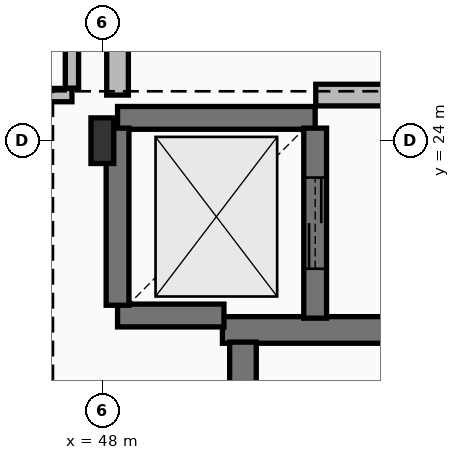
"""IFC4 building model, lengths in metres.
Left out: names, types, materials, properties, quantities, classifications, styles, units other than length and angle.
Written with IfcOpenShell. Run it as: python <this file> out.ifc"""

import sys

from ifc_helpers import new_model, si_unit, direction, frame, frame_2d, origin, origin_2d, place, context, subcontext, project, spatial, rectangle, i_section, extrude, element, fill, save


model = new_model("IFC4")
c1 = context("Model", 3, precision=1e-05, world=origin(), true_north=direction((0.0, 1.0)))
c2 = subcontext(c1, "Body", "Model", "MODEL_VIEW")
j1 = project(units=[si_unit("LENGTHUNIT", "METRE"), si_unit("PLANEANGLEUNIT", "RADIAN")], contexts=[c1])
p1 = place(None, origin())
s1 = spatial("IfcSite", under=j1, at=p1, CompositionType="ELEMENT")
p2 = place(p1, origin())
s2 = spatial("IfcBuilding", under=s1, at=p2, CompositionType="ELEMENT")
p3 = place(p2, origin())
s3 = spatial("IfcBuildingStorey", under=s2, at=p3, CompositionType="ELEMENT", Elevation=0.0)
p4 = place(p3, frame((48.0, 24.0, 0.0), z_axis=(0.0, 0.0, 1.0), x_axis=(1.0, 0.0, 0.0)))
e1 = element("IfcColumn", 1, at=p4, inside=s3, PredefinedType="COLUMN", context=c2, shape_type="SweptSolid", body=[
    extrude(i_section(OverallWidth=0.3, OverallDepth=0.6, WebThickness=0.015, FlangeThickness=0.03, FilletRadius=0.027, at=origin_2d()), origin(), (0.0, 0.0, 1.0), 6.0),
])
p5 = place(p3, frame((49.58, 21.51, 0.0), z_axis=(0.0, 0.0, 1.0), x_axis=(1.0, 0.0, 0.0)))
e2 = element("IfcWall", 2, at=p5, inside=s3, PredefinedType="SHEAR", context=c2, shape_type="SweptSolid", body=[
    extrude(rectangle(XDim=11.15, YDim=0.35, at=frame_2d((5.575, 0.0))), origin(), (0.0, 0.0, 1.0), 5.77),
])
p6 = place(p3, frame((49.85, 16.21, 0.0), z_axis=(0.0, 0.0, 1.0), x_axis=(0.0, 1.0, 0.0)))
e3 = element("IfcWall", 3, at=p6, inside=s3, PredefinedType="SHEAR", context=c2, shape_type="SweptSolid", body=[
    extrude(rectangle(XDim=5.14, YDim=0.35, at=frame_2d((2.57, 0.0))), origin(), (0.0, 0.0, 1.0), 5.77),
])
p7 = place(p3, frame((50.8, 24.3, 0.0), z_axis=(0.0, 0.0, 1.0), x_axis=(-1.0, 0.0, 0.0)))
e4 = element("IfcWall", 4, at=p7, inside=s3, PredefinedType="SHEAR", context=c2, shape_type="SweptSolid", body=[
    extrude(rectangle(XDim=2.6, YDim=0.3, at=frame_2d((1.3, 0.0))), origin(), (0.0, 0.0, 1.0), 5.77),
])
p8 = place(p3, frame((48.2, 21.7, 0.0), z_axis=(0.0, 0.0, 1.0), x_axis=(1.0, 0.0, 0.0)))
e5 = element("IfcWall", 5, at=p8, inside=s3, PredefinedType="SHEAR", context=c2, shape_type="SweptSolid", body=[
    extrude(rectangle(XDim=1.4, YDim=0.3, at=frame_2d((0.7, 0.0))), origin(), (0.0, 0.0, 1.0), 5.77),
])
p9 = place(p3, frame((50.8, 21.665, 0.0), z_axis=(0.0, 0.0, 1.0), x_axis=(0.0, 1.0, 0.0)))
e6 = element("IfcWall", 6, at=p9, inside=s3, PredefinedType="SHEAR", context=c2, shape_type="SweptSolid", body=[
    extrude(rectangle(XDim=2.5, YDim=0.3, at=frame_2d((1.25, 0.0))), origin(), (0.0, 0.0, 1.0), 5.77),
])
p10 = place(p9, frame((0.65, 0.0, 0.0)))
e7 = element("IfcOpeningElement", 7, at=p10, cuts=e6, PredefinedType="OPENING", context=c2, shape_type="SweptSolid", body=[
    extrude(rectangle(XDim=1.2, YDim=2.2, at=frame_2d((0.6, 1.1))), frame((0.0, 0.16, 0.0), z_axis=(0.0, -1.0, 0.0), x_axis=(1.0, 0.0, 0.0)), (0.0, 0.0, 1.0), 0.32),
])
p11 = place(p3, frame((48.2, 24.165, 0.0), z_axis=(0.0, 0.0, 1.0), x_axis=(0.0, -1.0, 0.0)))
e8 = element("IfcWall", 8, at=p11, inside=s3, PredefinedType="SHEAR", context=c2, shape_type="SweptSolid", body=[
    extrude(rectangle(XDim=2.33, YDim=0.3, at=frame_2d((1.165, 0.0))), origin(), (0.0, 0.0, 1.0), 5.77),
])
p12 = place(p3, frame((38.6, 24.6, 0.0), z_axis=(0.0, 0.0, 1.0), x_axis=(1.0, 0.0, 0.0)))
e9 = element("IfcWall", 9, at=p12, inside=s3, PredefinedType="PARTITIONING", context=c2, shape_type="SweptSolid", body=[
    extrude(rectangle(XDim=9.0, YDim=0.175, at=frame_2d((4.5, 0.0))), origin(), (0.0, 0.0, 1.0), 5.77),
])
p13 = place(p12, frame((3.92, 0.0, 0.0)))
e10 = element("IfcOpeningElement", 10, at=p13, cuts=e9, PredefinedType="OPENING", context=c2, shape_type="SweptSolid", body=[
    extrude(rectangle(XDim=1.16, YDim=2.32, at=frame_2d((0.58, 1.16))), frame((0.0, 0.097, 0.0), z_axis=(0.0, -1.0, 0.0), x_axis=(1.0, 0.0, 0.0)), (0.0, 0.0, 1.0), 0.195),
])
p14 = place(p3, frame((47.6, 24.691, 0.0), z_axis=(0.0, 0.0, 1.0), x_axis=(0.0, 1.0, 0.0)))
e11 = element("IfcWall", 11, at=p14, inside=s3, PredefinedType="PARTITIONING", context=c2, shape_type="SweptSolid", body=[
    extrude(rectangle(XDim=14.708, YDim=0.175, at=frame_2d((7.354, 0.0))), origin(), (0.0, 0.0, 1.0), 5.19),
])
p15 = place(p3, frame((50.808, 24.6, 0.0), z_axis=(0.0, 0.0, 1.0), x_axis=(1.0, 0.0, 0.0)))
e12 = element("IfcWall", 12, at=p15, inside=s3, PredefinedType="PLUMBINGWALL", context=c2, shape_type="SweptSolid", body=[
    extrude(rectangle(XDim=3.592, YDim=0.285, at=frame_2d((1.796, 0.0))), origin(), (0.0, 0.0, 1.0), 5.77),
])
p16 = place(p3, frame((48.2, 33.654, 0.0), z_axis=(0.0, 0.0, 1.0), x_axis=(0.0, -1.0, 0.0)))
e13 = element("IfcWall", 13, at=p16, inside=s3, PredefinedType="PLUMBINGWALL", context=c2, shape_type="SweptSolid", body=[
    extrude(rectangle(XDim=9.053, YDim=0.285, at=frame_2d((4.527, 0.0))), origin(), (0.0, 0.0, 1.0), 5.14),
])
p17 = place(p10, origin())
e14 = element("IfcDoor", 14, at=p17, inside=s3, OperationType="DOUBLE_DOOR_SLIDING", PredefinedType="DOOR", context=c2, shape_type="SweptSolid", body=[
    extrude(rectangle(XDim=1.2, YDim=2.2, at=frame_2d((0.6, 1.1))), frame((0.0, 0.025, 0.0), z_axis=(0.0, -1.0, 0.0), x_axis=(1.0, 0.0, 0.0)), (0.0, 0.0, 1.0), 0.05),
])
fill(e7, e14)
save(model, sys.argv[1])
